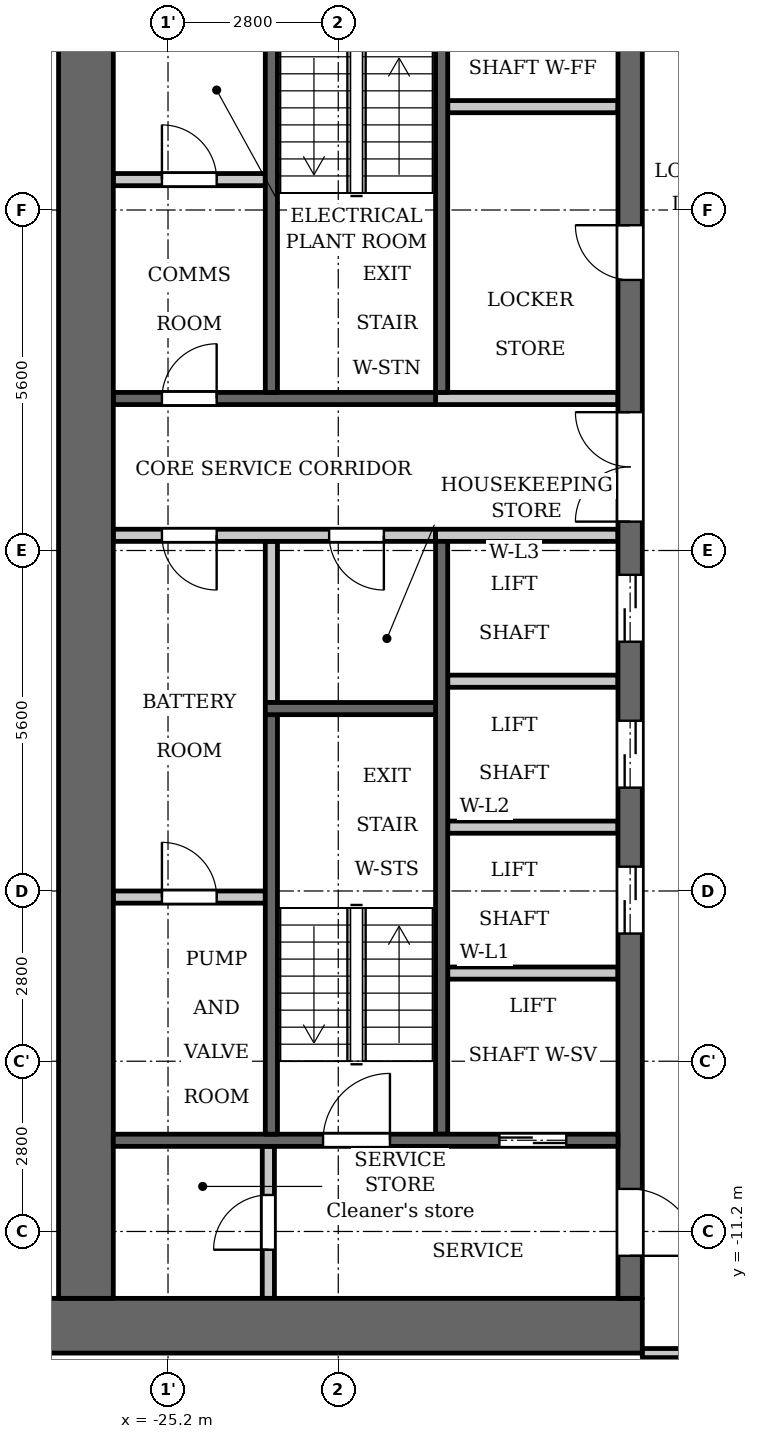
"""IFC4 building model, lengths in metres.
Left out: names, types, materials, properties, quantities, classifications, styles, units other than length and angle.
Written with IfcOpenShell. Run it as: python <this file> out.ifc"""

import sys

from ifc_helpers import new_model, si_unit, direction, frame, frame_2d, origin, place, context, subcontext, project, spatial, rectangle, extrude, element, fill, save


model = new_model("IFC4")
c1 = context("Model", 3, precision=1e-05, world=origin(), true_north=direction((0.0, 1.0)))
c2 = subcontext(c1, "Body", "Model", "MODEL_VIEW")
j1 = project(units=[si_unit("LENGTHUNIT", "METRE"), si_unit("PLANEANGLEUNIT", "RADIAN")], contexts=[c1])
p1 = place(None, origin())
s1 = spatial("IfcSite", under=j1, at=p1, CompositionType="ELEMENT")
p2 = place(p1, origin())
s2 = spatial("IfcBuilding", under=s1, at=p2, CompositionType="ELEMENT")
p3 = place(p2, frame((0.0, 0.0, 55.0)))
s3 = spatial("IfcBuildingStorey", under=s2, at=p3, CompositionType="ELEMENT", Elevation=55.0)
p4 = place(p3, frame((-23.5, -2.5, 0.0), z_axis=(0.0, 0.0, 1.0), x_axis=(0.0, 1.0, 0.0)))
e1 = element("IfcWall", 1, at=p4, inside=s3, PredefinedType="PARTITIONING", context=c2, shape_type="SweptSolid", body=[
    extrude(rectangle(XDim=2.65, YDim=0.2, at=frame_2d((1.325, 0.0))), origin(), (0.0, 0.0, 1.0), 3.2),
])
p5 = place(p3, frame((-20.7, 2.6, 0.0), z_axis=(0.0, 0.0, 1.0), x_axis=(0.0, 1.0, 0.0)))
e2 = element("IfcWall", 2, at=p5, inside=s3, PredefinedType="SHEAR", context=c2, shape_type="SweptSolid", body=[
    extrude(rectangle(XDim=7.0, YDim=0.2, at=frame_2d((3.5, 0.0))), origin(), (0.0, 0.0, 1.0), 3.2),
])
p6 = place(p3, frame((-20.7, -9.6, 0.0), z_axis=(0.0, 0.0, 1.0), x_axis=(0.0, 1.0, 0.0)))
e3 = element("IfcWall", 3, at=p6, inside=s3, PredefinedType="SHEAR", context=c2, shape_type="SweptSolid", body=[
    extrude(rectangle(XDim=9.75, YDim=0.2, at=frame_2d((4.875, 0.0))), origin(), (0.0, 0.0, 1.0), 3.2),
])
p7 = place(p3, frame((-20.8, 2.5, 0.0), z_axis=(0.0, 0.0, 1.0), x_axis=(-1.0, 0.0, 0.0)))
e4 = element("IfcWall", 4, at=p7, inside=s3, PredefinedType="SHEAR", context=c2, shape_type="SweptSolid", body=[
    extrude(rectangle(XDim=5.3, YDim=0.2, at=frame_2d((2.65, 0.0))), origin(), (0.0, 0.0, 1.0), 3.2),
])
p8 = place(p7, frame((3.6, 0.0, 0.0)))
e5 = element("IfcOpeningElement", 5, at=p8, cuts=e4, PredefinedType="OPENING", context=c2, shape_type="SweptSolid", body=[
    extrude(rectangle(XDim=0.9, YDim=2.1, at=frame_2d((0.45, 1.05))), frame((0.0, 0.11, 0.0), z_axis=(0.0, -1.0, 0.0), x_axis=(1.0, 0.0, 0.0)), (0.0, 0.0, 1.0), 0.22),
])
p9 = place(p3, frame((-20.8, 0.25, 0.0), z_axis=(0.0, 0.0, 1.0), x_axis=(-1.0, 0.0, 0.0)))
e6 = element("IfcWall", 6, at=p9, inside=s3, PredefinedType="PARTITIONING", context=c2, shape_type="SweptSolid", body=[
    extrude(rectangle(XDim=5.3, YDim=0.2, at=frame_2d((2.65, 0.0))), origin(), (0.0, 0.0, 1.0), 3.2),
])
p10 = place(p9, frame((0.85, 0.0, 0.0)))
e7 = element("IfcOpeningElement", 7, at=p10, cuts=e6, PredefinedType="OPENING", context=c2, shape_type="SweptSolid", body=[
    extrude(rectangle(XDim=0.9, YDim=2.1, at=frame_2d((0.45, 1.05))), frame((0.0, 0.11, 0.0), z_axis=(0.0, -1.0, 0.0), x_axis=(1.0, 0.0, 0.0)), (0.0, 0.0, 1.0), 0.22),
])
p11 = place(p9, frame((3.6, 0.0, 0.0)))
e8 = element("IfcOpeningElement", 8, at=p11, cuts=e6, PredefinedType="OPENING", context=c2, shape_type="SweptSolid", body=[
    extrude(rectangle(XDim=0.9, YDim=2.1, at=frame_2d((0.45, 1.05))), frame((0.0, 0.11, 0.0), z_axis=(0.0, -1.0, 0.0), x_axis=(1.0, 0.0, 0.0)), (0.0, 0.0, 1.0), 0.22),
])
p12 = place(p3, frame((-17.4, -12.75, 0.0), z_axis=(0.0, 0.0, 1.0), x_axis=(-1.0, 0.0, 0.0)))
e9 = element("IfcWall", 9, at=p12, inside=s3, PredefinedType="SHEAR", context=c2, shape_type="SweptSolid", body=[
    extrude(rectangle(XDim=10.4, YDim=0.9, at=frame_2d((5.2, 0.0))), origin(), (0.0, 0.0, 1.0), 3.2),
])
p13 = place(p3, frame((-17.6, -12.3, 0.0), z_axis=(0.0, 0.0, 1.0), x_axis=(0.0, 1.0, 0.0)))
e10 = element("IfcWall", 10, at=p13, inside=s3, PredefinedType="SHEAR", context=c2, shape_type="SweptSolid", body=[
    extrude(rectangle(XDim=24.6, YDim=0.4, at=frame_2d((12.3, 0.0))), origin(), (0.0, 0.0, 1.0), 3.2),
])
p14 = place(p13, frame((6.0, 0.0, 0.0)))
e11 = element("IfcOpeningElement", 11, at=p14, cuts=e10, PredefinedType="OPENING", context=c2, shape_type="SweptSolid", body=[
    extrude(rectangle(XDim=1.1, YDim=2.1, at=frame_2d((0.55, 1.05))), frame((0.0, 0.21, 0.0), z_axis=(0.0, -1.0, 0.0), x_axis=(1.0, 0.0, 0.0)), (0.0, 0.0, 1.0), 0.42),
])
p15 = place(p13, frame((8.4, 0.0, 0.0)))
e12 = element("IfcOpeningElement", 12, at=p15, cuts=e10, PredefinedType="OPENING", context=c2, shape_type="SweptSolid", body=[
    extrude(rectangle(XDim=1.1, YDim=2.1, at=frame_2d((0.55, 1.05))), frame((0.0, 0.21, 0.0), z_axis=(0.0, -1.0, 0.0), x_axis=(1.0, 0.0, 0.0)), (0.0, 0.0, 1.0), 0.42),
])
p16 = place(p13, frame((10.8, 0.0, 0.0)))
e13 = element("IfcOpeningElement", 13, at=p16, cuts=e10, PredefinedType="OPENING", context=c2, shape_type="SweptSolid", body=[
    extrude(rectangle(XDim=1.1, YDim=2.1, at=frame_2d((0.55, 1.05))), frame((0.0, 0.21, 0.0), z_axis=(0.0, -1.0, 0.0), x_axis=(1.0, 0.0, 0.0)), (0.0, 0.0, 1.0), 0.42),
])
p17 = place(p13, frame((16.75, 0.0, 0.0)))
e14 = element("IfcOpeningElement", 14, at=p17, cuts=e10, PredefinedType="OPENING", context=c2, shape_type="SweptSolid", body=[
    extrude(rectangle(XDim=0.9, YDim=2.1, at=frame_2d((0.45, 1.05))), frame((0.0, 0.21, 0.0), z_axis=(0.0, -1.0, 0.0), x_axis=(1.0, 0.0, 0.0)), (0.0, 0.0, 1.0), 0.42),
])
p18 = place(p13, frame((22.8, 0.0, 0.0)))
e15 = element("IfcOpeningElement", 15, at=p18, cuts=e10, PredefinedType="OPENING", context=c2, shape_type="SweptSolid", body=[
    extrude(rectangle(XDim=1.1, YDim=2.1, at=frame_2d((0.55, 1.05))), frame((0.0, 0.21, 0.0), z_axis=(0.0, -1.0, 0.0), x_axis=(1.0, 0.0, 0.0)), (0.0, 0.0, 1.0), 0.42),
])
p19 = place(p13, frame((0.7, 0.0, 0.0)))
e16 = element("IfcOpeningElement", 16, at=p19, cuts=e10, PredefinedType="OPENING", context=c2, shape_type="SweptSolid", body=[
    extrude(rectangle(XDim=1.1, YDim=2.1, at=frame_2d((0.55, 1.05))), frame((0.0, 0.21, 0.0), z_axis=(0.0, -1.0, 0.0), x_axis=(1.0, 0.0, 0.0)), (0.0, 0.0, 1.0), 0.42),
])
p20 = place(p13, frame((12.775, 0.0, 0.0)))
e17 = element("IfcOpeningElement", 17, at=p20, cuts=e10, PredefinedType="OPENING", context=c2, shape_type="SweptSolid", body=[
    extrude(rectangle(XDim=1.8, YDim=2.1, at=frame_2d((0.9, 1.05))), frame((0.0, 0.21, 0.0), z_axis=(0.0, -1.0, 0.0), x_axis=(1.0, 0.0, 0.0)), (0.0, 0.0, 1.0), 0.42),
])
p21 = place(p3, frame((-26.55, -12.3, 0.0), z_axis=(0.0, 0.0, 1.0), x_axis=(0.0, 1.0, 0.0)))
e18 = element("IfcWall", 18, at=p21, inside=s3, PredefinedType="SHEAR", context=c2, shape_type="SweptSolid", body=[
    extrude(rectangle(XDim=24.6, YDim=0.9, at=frame_2d((12.3, 0.0))), origin(), (0.0, 0.0, 1.0), 3.2),
])
p22 = place(p3, frame((-23.55, -12.3, 0.0), z_axis=(0.0, 0.0, 1.0), x_axis=(0.0, 1.0, 0.0)))
e19 = element("IfcWall", 19, at=p22, inside=s3, PredefinedType="PARTITIONING", context=c2, shape_type="SweptSolid", body=[
    extrude(rectangle(XDim=2.5, YDim=0.2, at=frame_2d((1.25, 0.0))), origin(), (0.0, 0.0, 1.0), 3.2),
])
p23 = place(p22, frame((0.8, 0.0, 0.0)))
e20 = element("IfcOpeningElement", 20, at=p23, cuts=e19, PredefinedType="OPENING", context=c2, shape_type="SweptSolid", body=[
    extrude(rectangle(XDim=0.9, YDim=2.1, at=frame_2d((0.45, 1.05))), frame((0.0, 0.11, 0.0), z_axis=(0.0, -1.0, 0.0), x_axis=(1.0, 0.0, 0.0)), (0.0, 0.0, 1.0), 0.22),
])
p24 = place(p3, frame((-23.6, -5.7, 0.0), z_axis=(0.0, 0.0, 1.0), x_axis=(-1.0, 0.0, 0.0)))
e21 = element("IfcWall", 21, at=p24, inside=s3, PredefinedType="PARTITIONING", context=c2, shape_type="SweptSolid", body=[
    extrude(rectangle(XDim=2.5, YDim=0.2, at=frame_2d((1.25, 0.0))), origin(), (0.0, 0.0, 1.0), 3.2),
])
p25 = place(p24, frame((0.8, 0.0, 0.0)))
e22 = element("IfcOpeningElement", 22, at=p25, cuts=e21, PredefinedType="OPENING", context=c2, shape_type="SweptSolid", body=[
    extrude(rectangle(XDim=0.9, YDim=2.1, at=frame_2d((0.45, 1.05))), frame((0.0, 0.11, 0.0), z_axis=(0.0, -1.0, 0.0), x_axis=(1.0, 0.0, 0.0)), (0.0, 0.0, 1.0), 0.22),
])
p26 = place(p3, frame((-23.6, 6.1, 0.0), z_axis=(0.0, 0.0, 1.0), x_axis=(-1.0, 0.0, 0.0)))
e23 = element("IfcWall", 23, at=p26, inside=s3, PredefinedType="PARTITIONING", context=c2, shape_type="SweptSolid", body=[
    extrude(rectangle(XDim=2.5, YDim=0.2, at=frame_2d((1.25, 0.0))), origin(), (0.0, 0.0, 1.0), 3.2),
])
p27 = place(p26, frame((0.8, 0.0, 0.0)))
e24 = element("IfcOpeningElement", 24, at=p27, cuts=e23, PredefinedType="OPENING", context=c2, shape_type="SweptSolid", body=[
    extrude(rectangle(XDim=0.9, YDim=2.1, at=frame_2d((0.45, 1.05))), frame((0.0, 0.11, 0.0), z_axis=(0.0, -1.0, 0.0), x_axis=(1.0, 0.0, 0.0)), (0.0, 0.0, 1.0), 0.22),
])
p28 = place(p3, frame((-17.8, -9.7, 0.0), z_axis=(0.0, 0.0, 1.0), x_axis=(-1.0, 0.0, 0.0)))
e25 = element("IfcWall", 25, at=p28, inside=s3, PredefinedType="SHEAR", context=c2, shape_type="SweptSolid", body=[
    extrude(rectangle(XDim=8.3, YDim=0.2, at=frame_2d((4.15, 0.0))), origin(), (0.0, 0.0, 1.0), 3.2),
])
p29 = place(p28, frame((0.85, 0.0, 0.0)))
e26 = element("IfcOpeningElement", 26, at=p29, cuts=e25, PredefinedType="OPENING", context=c2, shape_type="SweptSolid", body=[
    extrude(rectangle(XDim=1.1, YDim=2.1, at=frame_2d((0.55, 1.05))), frame((0.0, 0.11, 0.0), z_axis=(0.0, -1.0, 0.0), x_axis=(1.0, 0.0, 0.0)), (0.0, 0.0, 1.0), 0.22),
])
p30 = place(p28, frame((3.75, 0.0, 0.0)))
e27 = element("IfcOpeningElement", 27, at=p30, cuts=e25, PredefinedType="OPENING", context=c2, shape_type="SweptSolid", body=[
    extrude(rectangle(XDim=1.1, YDim=2.1, at=frame_2d((0.55, 1.05))), frame((0.0, 0.11, 0.0), z_axis=(0.0, -1.0, 0.0), x_axis=(1.0, 0.0, 0.0)), (0.0, 0.0, 1.0), 0.22),
])
for number, where, z_axis, x_axis in (
    (28, (-17.8, -6.95, 0.0), (0.0, 0.0, 1.0), (-1.0, 0.0, 0.0)),
    (29, (-17.8, -4.55, 0.0), (0.0, 0.0, 1.0), (-1.0, 0.0, 0.0)),
    (30, (-17.8, -2.15, 0.0), (0.0, 0.0, 1.0), (-1.0, 0.0, 0.0)),
):
    element("IfcWall", number, at=place(p3, frame(where, z_axis=z_axis, x_axis=x_axis)), inside=s3, PredefinedType="PARTITIONING", context=c2, shape_type="SweptSolid", body=[
        extrude(rectangle(XDim=2.8, YDim=0.2, at=frame_2d((1.4, 0.0))), origin(), (0.0, 0.0, 1.0), 3.2),
    ])
for number, where, z_axis, x_axis in (
    (31, (-17.8, 0.25, 0.0), (0.0, 0.0, 1.0), (-1.0, 0.0, 0.0)),
    (32, (-17.8, 2.5, 0.0), (0.0, 0.0, 1.0), (-1.0, 0.0, 0.0)),
):
    element("IfcWall", number, at=place(p3, frame(where, z_axis=z_axis, x_axis=x_axis)), inside=s3, PredefinedType="PARTITIONING", context=c2, shape_type="SweptSolid", body=[
        extrude(rectangle(XDim=3.0, YDim=0.2, at=frame_2d((1.5, 0.0))), origin(), (0.0, 0.0, 1.0), 3.2),
    ])
p31 = place(p3, frame((-17.8, 7.3, 0.0), z_axis=(0.0, 0.0, 1.0), x_axis=(-1.0, 0.0, 0.0)))
e33 = element("IfcWall", 33, at=p31, inside=s3, PredefinedType="PARTITIONING", context=c2, shape_type="SweptSolid", body=[
    extrude(rectangle(XDim=2.8, YDim=0.2, at=frame_2d((1.4, 0.0))), origin(), (0.0, 0.0, 1.0), 3.2),
])
p32 = place(p3, frame((-23.5, 2.6, 0.0), z_axis=(0.0, 0.0, 1.0), x_axis=(0.0, 1.0, 0.0)))
e34 = element("IfcWall", 34, at=p32, inside=s3, PredefinedType="SHEAR", context=c2, shape_type="SweptSolid", body=[
    extrude(rectangle(XDim=7.0, YDim=0.2, at=frame_2d((3.5, 0.0))), origin(), (0.0, 0.0, 1.0), 3.2),
])
p33 = place(p3, frame((-23.5, -9.6, 0.0), z_axis=(0.0, 0.0, 1.0), x_axis=(0.0, 1.0, 0.0)))
e35 = element("IfcWall", 35, at=p33, inside=s3, PredefinedType="SHEAR", context=c2, shape_type="SweptSolid", body=[
    extrude(rectangle(XDim=6.9, YDim=0.2, at=frame_2d((3.45, 0.0))), origin(), (0.0, 0.0, 1.0), 3.2),
])
p34 = place(p3, frame((-20.8, -2.6, 0.0), z_axis=(0.0, 0.0, 1.0), x_axis=(-1.0, 0.0, 0.0)))
e36 = element("IfcWall", 36, at=p34, inside=s3, PredefinedType="SHEAR", context=c2, shape_type="SweptSolid", body=[
    extrude(rectangle(XDim=2.8, YDim=0.2, at=frame_2d((1.4, 0.0))), origin(), (0.0, 0.0, 1.0), 3.2),
])
p35 = place(p3, frame((-17.4, -13.2, 0.0), z_axis=(0.0, 0.0, 1.0), x_axis=(1.0, 0.0, 0.0)))
e37 = element("IfcWall", 37, at=p35, inside=s3, PredefinedType="PARTITIONING", context=c2, shape_type="SweptSolid", body=[
    extrude(rectangle(XDim=34.8, YDim=0.15, at=frame_2d((17.4, 0.0))), origin(), (0.0, 0.0, 1.0), 3.2),
])
p36 = place(p35, frame((0.65, 0.0, 0.0)))
e38 = element("IfcOpeningElement", 38, at=p36, cuts=e37, PredefinedType="OPENING", context=c2, shape_type="SweptSolid", body=[
    extrude(rectangle(XDim=1.0, YDim=2.1, at=frame_2d((0.5, 1.05))), frame((0.0, 0.085, 0.0), z_axis=(0.0, -1.0, 0.0), x_axis=(1.0, 0.0, 0.0)), (0.0, 0.0, 1.0), 0.17),
])
p37 = place(p35, frame((33.05, 0.0, 0.0)))
e39 = element("IfcOpeningElement", 39, at=p37, cuts=e37, PredefinedType="OPENING", context=c2, shape_type="SweptSolid", body=[
    extrude(rectangle(XDim=1.0, YDim=2.1, at=frame_2d((0.5, 1.05))), frame((0.0, 0.085, 0.0), z_axis=(0.0, -1.0, 0.0), x_axis=(1.0, 0.0, 0.0)), (0.0, 0.0, 1.0), 0.17),
])
p38 = place(p35, frame((10.15, 0.0, 0.0)))
e40 = element("IfcOpeningElement", 40, at=p38, cuts=e37, PredefinedType="OPENING", context=c2, shape_type="SweptSolid", body=[
    extrude(rectangle(XDim=1.0, YDim=2.1, at=frame_2d((0.5, 1.05))), frame((0.0, 0.085, 0.0), z_axis=(0.0, -1.0, 0.0), x_axis=(1.0, 0.0, 0.0)), (0.0, 0.0, 1.0), 0.17),
])
p39 = place(p35, frame((21.35, 0.0, 0.0)))
e41 = element("IfcOpeningElement", 41, at=p39, cuts=e37, PredefinedType="OPENING", context=c2, shape_type="SweptSolid", body=[
    extrude(rectangle(XDim=1.0, YDim=2.1, at=frame_2d((0.5, 1.05))), frame((0.0, 0.085, 0.0), z_axis=(0.0, -1.0, 0.0), x_axis=(1.0, 0.0, 0.0)), (0.0, 0.0, 1.0), 0.17),
])
p40 = place(p35, frame((30.75, 0.0, 0.0)))
e42 = element("IfcOpeningElement", 42, at=p40, cuts=e37, PredefinedType="OPENING", context=c2, shape_type="SweptSolid", body=[
    extrude(rectangle(XDim=1.0, YDim=2.1, at=frame_2d((0.5, 1.05))), frame((0.0, 0.085, 0.0), z_axis=(0.0, -1.0, 0.0), x_axis=(1.0, 0.0, 0.0)), (0.0, 0.0, 1.0), 0.17),
])
p41 = place(p29, origin())
e43 = element("IfcDoor", 43, at=p41, inside=s3, OperationType="DOUBLE_DOOR_SLIDING", PredefinedType="DOOR", context=c2, shape_type="SweptSolid", body=[
    extrude(rectangle(XDim=1.1, YDim=2.1, at=frame_2d((0.55, 1.05))), frame((0.0, 0.025, 0.0), z_axis=(0.0, -1.0, 0.0), x_axis=(1.0, 0.0, 0.0)), (0.0, 0.0, 1.0), 0.05),
])
fill(e26, e43)
p42 = place(p14, origin())
e44 = element("IfcDoor", 44, at=p42, inside=s3, OperationType="DOUBLE_DOOR_SLIDING", PredefinedType="DOOR", context=c2, shape_type="SweptSolid", body=[
    extrude(rectangle(XDim=1.1, YDim=2.1, at=frame_2d((0.55, 1.05))), frame((0.0, 0.025, 0.0), z_axis=(0.0, -1.0, 0.0), x_axis=(1.0, 0.0, 0.0)), (0.0, 0.0, 1.0), 0.05),
])
fill(e11, e44)
p43 = place(p15, origin())
e45 = element("IfcDoor", 45, at=p43, inside=s3, OperationType="DOUBLE_DOOR_SLIDING", PredefinedType="DOOR", context=c2, shape_type="SweptSolid", body=[
    extrude(rectangle(XDim=1.1, YDim=2.1, at=frame_2d((0.55, 1.05))), frame((0.0, 0.025, 0.0), z_axis=(0.0, -1.0, 0.0), x_axis=(1.0, 0.0, 0.0)), (0.0, 0.0, 1.0), 0.05),
])
fill(e12, e45)
p44 = place(p16, origin())
e46 = element("IfcDoor", 46, at=p44, inside=s3, OperationType="DOUBLE_DOOR_SLIDING", PredefinedType="DOOR", context=c2, shape_type="SweptSolid", body=[
    extrude(rectangle(XDim=1.1, YDim=2.1, at=frame_2d((0.55, 1.05))), frame((0.0, 0.025, 0.0), z_axis=(0.0, -1.0, 0.0), x_axis=(1.0, 0.0, 0.0)), (0.0, 0.0, 1.0), 0.05),
])
fill(e13, e46)
p45 = place(p17, origin())
e47 = element("IfcDoor", 47, at=p45, inside=s3, OperationType="SINGLE_SWING_LEFT", PredefinedType="DOOR", context=c2, shape_type="SweptSolid", body=[
    extrude(rectangle(XDim=0.9, YDim=2.1, at=frame_2d((0.45, 1.05))), frame((0.0, 0.025, 0.0), z_axis=(0.0, -1.0, 0.0), x_axis=(1.0, 0.0, 0.0)), (0.0, 0.0, 1.0), 0.05),
])
fill(e14, e47)
p46 = place(p19, origin())
e48 = element("IfcDoor", 48, at=p46, inside=s3, OperationType="SINGLE_SWING_LEFT", PredefinedType="DOOR", context=c2, shape_type="SweptSolid", body=[
    extrude(rectangle(XDim=1.1, YDim=2.1, at=frame_2d((0.55, 1.05))), frame((0.0, 0.025, 0.0), z_axis=(0.0, -1.0, 0.0), x_axis=(1.0, 0.0, 0.0)), (0.0, 0.0, 1.0), 0.05),
])
fill(e16, e48)
p47 = place(p23, origin())
e49 = element("IfcDoor", 49, at=p47, inside=s3, OperationType="SINGLE_SWING_RIGHT", PredefinedType="DOOR", context=c2, shape_type="SweptSolid", body=[
    extrude(rectangle(XDim=0.9, YDim=2.1, at=frame_2d((0.45, 1.05))), frame((0.0, 0.025, 0.0), z_axis=(0.0, -1.0, 0.0), x_axis=(1.0, 0.0, 0.0)), (0.0, 0.0, 1.0), 0.05),
])
fill(e20, e49)
p48 = place(p30, origin())
e50 = element("IfcDoor", 50, at=p48, inside=s3, OperationType="SINGLE_SWING_LEFT", PredefinedType="DOOR", context=c2, shape_type="SweptSolid", body=[
    extrude(rectangle(XDim=1.1, YDim=2.1, at=frame_2d((0.55, 1.05))), frame((0.0, 0.025, 0.0), z_axis=(0.0, -1.0, 0.0), x_axis=(1.0, 0.0, 0.0)), (0.0, 0.0, 1.0), 0.05),
])
fill(e27, e50)
p49 = place(p20, origin())
e51 = element("IfcDoor", 51, at=p49, inside=s3, OperationType="DOUBLE_DOOR_SINGLE_SWING", PredefinedType="DOOR", context=c2, shape_type="SweptSolid", body=[
    extrude(rectangle(XDim=1.8, YDim=2.1, at=frame_2d((0.9, 1.05))), frame((0.0, 0.025, 0.0), z_axis=(0.0, -1.0, 0.0), x_axis=(1.0, 0.0, 0.0)), (0.0, 0.0, 1.0), 0.05),
])
fill(e17, e51)
p50 = place(p10, origin())
e52 = element("IfcDoor", 52, at=p50, inside=s3, OperationType="SINGLE_SWING_RIGHT", PredefinedType="DOOR", context=c2, shape_type="SweptSolid", body=[
    extrude(rectangle(XDim=0.9, YDim=2.1, at=frame_2d((0.45, 1.05))), frame((0.0, 0.025, 0.0), z_axis=(0.0, -1.0, 0.0), x_axis=(1.0, 0.0, 0.0)), (0.0, 0.0, 1.0), 0.05),
])
fill(e7, e52)
p51 = place(p25, origin())
e53 = element("IfcDoor", 53, at=p51, inside=s3, OperationType="SINGLE_SWING_RIGHT", PredefinedType="DOOR", context=c2, shape_type="SweptSolid", body=[
    extrude(rectangle(XDim=0.9, YDim=2.1, at=frame_2d((0.45, 1.05))), frame((0.0, 0.025, 0.0), z_axis=(0.0, -1.0, 0.0), x_axis=(1.0, 0.0, 0.0)), (0.0, 0.0, 1.0), 0.05),
])
fill(e22, e53)
p52 = place(p11, origin())
e54 = element("IfcDoor", 54, at=p52, inside=s3, OperationType="SINGLE_SWING_RIGHT", PredefinedType="DOOR", context=c2, shape_type="SweptSolid", body=[
    extrude(rectangle(XDim=0.9, YDim=2.1, at=frame_2d((0.45, 1.05))), frame((0.0, 0.025, 0.0), z_axis=(0.0, -1.0, 0.0), x_axis=(1.0, 0.0, 0.0)), (0.0, 0.0, 1.0), 0.05),
])
fill(e8, e54)
p53 = place(p27, origin())
e55 = element("IfcDoor", 55, at=p53, inside=s3, OperationType="SINGLE_SWING_RIGHT", PredefinedType="DOOR", context=c2, shape_type="SweptSolid", body=[
    extrude(rectangle(XDim=0.9, YDim=2.1, at=frame_2d((0.45, 1.05))), frame((0.0, 0.025, 0.0), z_axis=(0.0, -1.0, 0.0), x_axis=(1.0, 0.0, 0.0)), (0.0, 0.0, 1.0), 0.05),
])
fill(e24, e55)
p54 = place(p8, origin())
e56 = element("IfcDoor", 56, at=p54, inside=s3, OperationType="SINGLE_SWING_LEFT", PredefinedType="DOOR", context=c2, shape_type="SweptSolid", body=[
    extrude(rectangle(XDim=0.9, YDim=2.1, at=frame_2d((0.45, 1.05))), frame((0.0, 0.025, 0.0), z_axis=(0.0, -1.0, 0.0), x_axis=(1.0, 0.0, 0.0)), (0.0, 0.0, 1.0), 0.05),
])
fill(e5, e56)
save(model, sys.argv[1])
